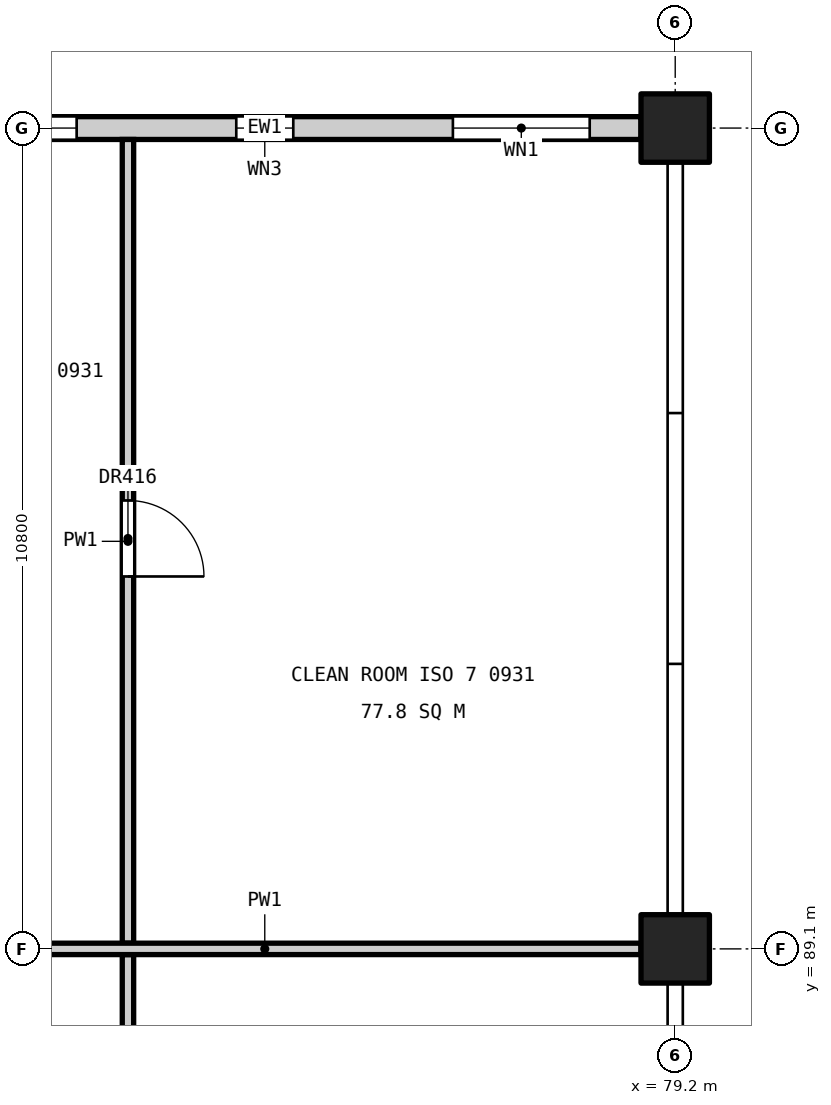
"""IFC4 building model, lengths in metres.
Left out: names, types, materials, properties, quantities, classifications, styles, units other than length and angle.
Written with IfcOpenShell. Run it as: python <this file> out.ifc"""

import sys

from ifc_helpers import new_model, si_unit, direction, frame, frame_2d, origin, origin_2d, place, context, subcontext, project, spatial, rectangle, extrude, element, fill, save


model = new_model("IFC4")
c1 = context("Model", 3, precision=1e-05, world=origin(), true_north=direction((0.0, 1.0)))
c2 = subcontext(c1, "Body", "Model", "MODEL_VIEW")
j1 = project(units=[si_unit("LENGTHUNIT", "METRE"), si_unit("PLANEANGLEUNIT", "RADIAN")], contexts=[c1])
p1 = place(None, origin())
s1 = spatial("IfcSite", under=j1, at=p1, CompositionType="ELEMENT")
p2 = place(p1, origin())
s2 = spatial("IfcBuilding", under=s1, at=p2, CompositionType="ELEMENT")
p3 = place(p2, frame((0.0, 0.0, 46.2)))
s3 = spatial("IfcBuildingStorey", under=s2, at=p3, CompositionType="ELEMENT", Elevation=46.2)
for number, where, z_axis, x_axis in (
    (1, (79.2, 89.1, 0.0), (0.0, 0.0, 1.0), (1.0, 0.0, 0.0)),
    (2, (79.2, 99.9, 0.0), (0.0, 0.0, 1.0), (1.0, 0.0, 0.0)),
):
    element("IfcColumn", number, at=place(p3, frame(where, z_axis=z_axis, x_axis=x_axis)), inside=s3, PredefinedType="COLUMN", context=c2, shape_type="SweptSolid", body=[
        extrude(rectangle(XDim=0.9, YDim=0.9, at=origin_2d()), origin(), (0.0, 0.0, 1.0), 4.8),
    ])
p4 = place(p3, frame((68.85, 99.9, 0.0), z_axis=(0.0, 0.0, 1.0), x_axis=(1.0, 0.0, 0.0)))
e3 = element("IfcWall", 3, at=p4, inside=s3, PredefinedType="STANDARD", context=c2, shape_type="SweptSolid", body=[
    extrude(rectangle(XDim=9.9, YDim=0.3, at=frame_2d((4.95, 0.0))), origin(), (0.0, 0.0, 1.0), 3.85),
])
p5 = place(p4, frame((0.675, 0.0, 0.9)))
e4 = element("IfcOpeningElement", 4, at=p5, cuts=e3, PredefinedType="OPENING", context=c2, shape_type="SweptSolid", body=[
    extrude(rectangle(XDim=1.8, YDim=2.4, at=frame_2d((0.9, 1.2))), frame((0.0, 0.16, 0.0), z_axis=(0.0, -1.0, 0.0), x_axis=(1.0, 0.0, 0.0)), (0.0, 0.0, 1.0), 0.32),
])
p6 = place(p4, frame((4.575, 0.0, 0.8)))
e5 = element("IfcOpeningElement", 5, at=p6, cuts=e3, PredefinedType="OPENING", context=c2, shape_type="SweptSolid", body=[
    extrude(rectangle(XDim=0.75, YDim=1.2, at=frame_2d((0.375, 0.6))), frame((0.0, 0.16, 0.0), z_axis=(0.0, -1.0, 0.0), x_axis=(1.0, 0.0, 0.0)), (0.0, 0.0, 1.0), 0.32),
])
p7 = place(p4, frame((7.425, 0.0, 0.9)))
e6 = element("IfcOpeningElement", 6, at=p7, cuts=e3, PredefinedType="OPENING", context=c2, shape_type="SweptSolid", body=[
    extrude(rectangle(XDim=1.8, YDim=2.4, at=frame_2d((0.9, 1.2))), frame((0.0, 0.16, 0.0), z_axis=(0.0, -1.0, 0.0), x_axis=(1.0, 0.0, 0.0)), (0.0, 0.0, 1.0), 0.32),
])
p8 = place(p3, frame((72.0, 85.575, 0.0), z_axis=(0.0, 0.0, 1.0), x_axis=(0.0, 1.0, 0.0)))
e7 = element("IfcWall", 7, at=p8, inside=s3, PredefinedType="PARTITIONING", context=c2, shape_type="SweptSolid", body=[
    extrude(rectangle(XDim=3.45, YDim=0.15, at=frame_2d((1.725, 0.0))), origin(), (0.0, 0.0, 1.0), 3.55),
])
p9 = place(p8, frame((1.225, 0.0, 0.0)))
e8 = element("IfcOpeningElement", 8, at=p9, cuts=e7, PredefinedType="OPENING", context=c2, shape_type="SweptSolid", body=[
    extrude(rectangle(XDim=1.0, YDim=2.1, at=frame_2d((0.5, 1.05))), frame((0.0, 0.085, 0.0), z_axis=(0.0, -1.0, 0.0), x_axis=(1.0, 0.0, 0.0)), (0.0, 0.0, 1.0), 0.17),
])
p10 = place(p3, frame((72.0, 89.175, 0.0), z_axis=(0.0, 0.0, 1.0), x_axis=(0.0, 1.0, 0.0)))
e9 = element("IfcWall", 9, at=p10, inside=s3, PredefinedType="PARTITIONING", context=c2, shape_type="SweptSolid", body=[
    extrude(rectangle(XDim=10.575, YDim=0.15, at=frame_2d((5.288, 0.0))), origin(), (0.0, 0.0, 1.0), 3.55),
])
p11 = place(p10, frame((4.825, 0.0, 0.0)))
e10 = element("IfcOpeningElement", 10, at=p11, cuts=e9, PredefinedType="OPENING", context=c2, shape_type="SweptSolid", body=[
    extrude(rectangle(XDim=1.0, YDim=2.1, at=frame_2d((0.5, 1.05))), frame((0.0, 0.085, 0.0), z_axis=(0.0, -1.0, 0.0), x_axis=(1.0, 0.0, 0.0)), (0.0, 0.0, 1.0), 0.17),
])
p12 = place(p3, frame((68.85, 89.1, 0.0), z_axis=(0.0, 0.0, 1.0), x_axis=(1.0, 0.0, 0.0)))
e11 = element("IfcWall", 11, at=p12, inside=s3, PredefinedType="PARTITIONING", context=c2, shape_type="SweptSolid", body=[
    extrude(rectangle(XDim=9.9, YDim=0.15, at=frame_2d((4.95, 0.0))), origin(), (0.0, 0.0, 1.0), 3.85),
])
p13 = place(p5, origin())
e12 = element("IfcWindow", 12, at=p13, inside=s3, PartitioningType="SINGLE_PANEL", PredefinedType="WINDOW", context=c2, shape_type="SweptSolid", body=[
    extrude(rectangle(XDim=1.8, YDim=2.4, at=frame_2d((0.9, 1.2))), frame((0.0, 0.03, 0.0), z_axis=(0.0, -1.0, 0.0), x_axis=(1.0, 0.0, 0.0)), (0.0, 0.0, 1.0), 0.06),
])
fill(e4, e12)
p14 = place(p6, origin())
e13 = element("IfcWindow", 13, at=p14, inside=s3, PartitioningType="SINGLE_PANEL", PredefinedType="WINDOW", context=c2, shape_type="SweptSolid", body=[
    extrude(rectangle(XDim=0.75, YDim=1.2, at=frame_2d((0.375, 0.6))), frame((0.0, 0.03, 0.0), z_axis=(0.0, -1.0, 0.0), x_axis=(1.0, 0.0, 0.0)), (0.0, 0.0, 1.0), 0.06),
])
fill(e5, e13)
p15 = place(p7, origin())
e14 = element("IfcWindow", 14, at=p15, inside=s3, PartitioningType="SINGLE_PANEL", PredefinedType="WINDOW", context=c2, shape_type="SweptSolid", body=[
    extrude(rectangle(XDim=1.8, YDim=2.4, at=frame_2d((0.9, 1.2))), frame((0.0, 0.03, 0.0), z_axis=(0.0, -1.0, 0.0), x_axis=(1.0, 0.0, 0.0)), (0.0, 0.0, 1.0), 0.06),
])
fill(e6, e14)
p16 = place(p11, frame((1.0, 0.0, 0.0), z_axis=(0.0, 0.0, 1.0), x_axis=(-1.0, 0.0, 0.0)))
e15 = element("IfcDoor", 15, at=p16, inside=s3, OperationType="SINGLE_SWING_RIGHT", PredefinedType="DOOR", context=c2, shape_type="SweptSolid", body=[
    extrude(rectangle(XDim=1.0, YDim=2.1, at=frame_2d((0.5, 1.05))), frame((0.0, 0.025, 0.0), z_axis=(0.0, -1.0, 0.0), x_axis=(1.0, 0.0, 0.0)), (0.0, 0.0, 1.0), 0.05),
])
fill(e10, e15)
save(model, sys.argv[1])
